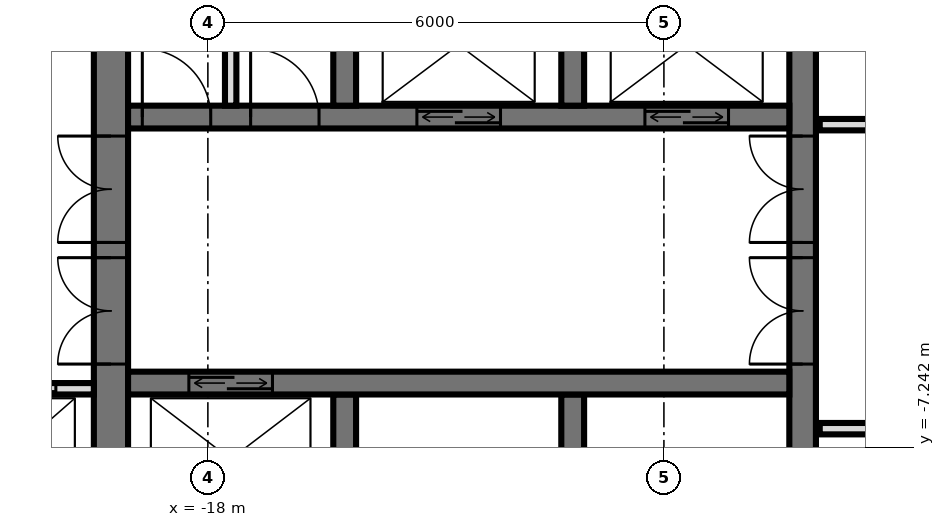
"""IFC4 building model, lengths in metres.
Left out: names, types, materials, properties, quantities, classifications, styles, units other than length and angle.
Written with IfcOpenShell. Run it as: python <this file> out.ifc"""

import sys

from ifc_helpers import new_model, si_unit, direction, frame, frame_2d, origin, place, context, subcontext, project, spatial, rectangle, extrude, element, fill, save


model = new_model("IFC4")
c1 = context("Model", 3, precision=1e-05, world=origin(), true_north=direction((0.0, 1.0)))
c2 = subcontext(c1, "Body", "Model", "MODEL_VIEW")
j1 = project(units=[si_unit("LENGTHUNIT", "METRE"), si_unit("PLANEANGLEUNIT", "RADIAN")], contexts=[c1])
p1 = place(None, origin())
s1 = spatial("IfcSite", under=j1, at=p1, CompositionType="ELEMENT")
p2 = place(p1, origin())
s2 = spatial("IfcBuilding", under=s1, at=p2, CompositionType="ELEMENT")
p3 = place(p2, frame((0.0, 0.0, 246.6)))
s3 = spatial("IfcBuildingStorey", under=s2, at=p3, CompositionType="ELEMENT", Elevation=246.6)
p4 = place(p3, frame((-10.175, -14.55, 0.0), z_axis=(0.0, 0.0, 1.0), x_axis=(0.0, 1.0, 0.0)))
e1 = element("IfcWall", 1, at=p4, inside=s3, PredefinedType="SHEAR", context=c2, shape_type="SweptSolid", body=[
    extrude(rectangle(XDim=14.1, YDim=0.35, at=frame_2d((7.05, 0.0))), origin(), (0.0, 0.0, 1.0), 6.0),
])
p5 = place(p4, frame((8.4, 0.0, 0.0)))
e2 = element("IfcOpeningElement", 2, at=p5, cuts=e1, PredefinedType="OPENING", context=c2, shape_type="SweptSolid", body=[
    extrude(rectangle(XDim=1.4, YDim=2.4, at=frame_2d((0.7, 1.2))), frame((0.0, 0.185, 0.0), z_axis=(0.0, -1.0, 0.0), x_axis=(1.0, 0.0, 0.0)), (0.0, 0.0, 1.0), 0.37),
])
p6 = place(p4, frame((10.0, 0.0, 0.0)))
e3 = element("IfcOpeningElement", 3, at=p6, cuts=e1, PredefinedType="OPENING", context=c2, shape_type="SweptSolid", body=[
    extrude(rectangle(XDim=1.4, YDim=2.4, at=frame_2d((0.7, 1.2))), frame((0.0, 0.185, 0.0), z_axis=(0.0, -1.0, 0.0), x_axis=(1.0, 0.0, 0.0)), (0.0, 0.0, 1.0), 0.37),
])
p7 = place(p4, frame((4.0, 0.0, 0.0)))
e4 = element("IfcOpeningElement", 4, at=p7, cuts=e1, PredefinedType="OPENING", context=c2, shape_type="SweptSolid", body=[
    extrude(rectangle(XDim=1.2, YDim=2.1, at=frame_2d((0.6, 1.05))), frame((0.0, 0.185, 0.0), z_axis=(0.0, -1.0, 0.0), x_axis=(1.0, 0.0, 0.0)), (0.0, 0.0, 1.0), 0.37),
])
p8 = place(p3, frame((-19.275, -14.55, 0.0), z_axis=(0.0, 0.0, 1.0), x_axis=(0.0, 1.0, 0.0)))
e5 = element("IfcWall", 5, at=p8, inside=s3, PredefinedType="SHEAR", context=c2, shape_type="SweptSolid", body=[
    extrude(rectangle(XDim=14.1, YDim=0.45, at=frame_2d((7.05, 0.0))), origin(), (0.0, 0.0, 1.0), 6.0),
])
p9 = place(p8, frame((8.4, 0.0, 0.0)))
e6 = element("IfcOpeningElement", 6, at=p9, cuts=e5, PredefinedType="OPENING", context=c2, shape_type="SweptSolid", body=[
    extrude(rectangle(XDim=1.4, YDim=2.4, at=frame_2d((0.7, 1.2))), frame((0.0, 0.235, 0.0), z_axis=(0.0, -1.0, 0.0), x_axis=(1.0, 0.0, 0.0)), (0.0, 0.0, 1.0), 0.47),
])
p10 = place(p8, frame((10.0, 0.0, 0.0)))
e7 = element("IfcOpeningElement", 7, at=p10, cuts=e5, PredefinedType="OPENING", context=c2, shape_type="SweptSolid", body=[
    extrude(rectangle(XDim=1.4, YDim=2.4, at=frame_2d((0.7, 1.2))), frame((0.0, 0.235, 0.0), z_axis=(0.0, -1.0, 0.0), x_axis=(1.0, 0.0, 0.0)), (0.0, 0.0, 1.0), 0.47),
])
p11 = place(p3, frame((-19.05, -2.9, 0.0), z_axis=(0.0, 0.0, 1.0), x_axis=(1.0, 0.0, 0.0)))
e8 = element("IfcWall", 8, at=p11, inside=s3, PredefinedType="SHEAR", context=c2, shape_type="SweptSolid", body=[
    extrude(rectangle(XDim=8.7, YDim=0.3, at=frame_2d((4.35, 0.0))), origin(), (0.0, 0.0, 1.0), 6.0),
])
p12 = place(p11, frame((6.8, 0.0, 0.0)))
e9 = element("IfcOpeningElement", 9, at=p12, cuts=e8, PredefinedType="OPENING", context=c2, shape_type="SweptSolid", body=[
    extrude(rectangle(XDim=1.1, YDim=2.1, at=frame_2d((0.55, 1.05))), frame((0.0, 0.16, 0.0), z_axis=(0.0, -1.0, 0.0), x_axis=(1.0, 0.0, 0.0)), (0.0, 0.0, 1.0), 0.32),
])
p13 = place(p11, frame((3.8, 0.0, 0.0)))
e10 = element("IfcOpeningElement", 10, at=p13, cuts=e8, PredefinedType="OPENING", context=c2, shape_type="SweptSolid", body=[
    extrude(rectangle(XDim=1.1, YDim=2.1, at=frame_2d((0.55, 1.05))), frame((0.0, 0.16, 0.0), z_axis=(0.0, -1.0, 0.0), x_axis=(1.0, 0.0, 0.0)), (0.0, 0.0, 1.0), 0.32),
])
p14 = place(p11, frame((1.613, 0.0, 0.0)))
e11 = element("IfcOpeningElement", 11, at=p14, cuts=e8, PredefinedType="OPENING", context=c2, shape_type="SweptSolid", body=[
    extrude(rectangle(XDim=0.9, YDim=2.1, at=frame_2d((0.45, 1.05))), frame((0.0, 0.16, 0.0), z_axis=(0.0, -1.0, 0.0), x_axis=(1.0, 0.0, 0.0)), (0.0, 0.0, 1.0), 0.32),
])
p15 = place(p11, frame((0.188, 0.0, 0.0)))
e12 = element("IfcOpeningElement", 12, at=p15, cuts=e8, PredefinedType="OPENING", context=c2, shape_type="SweptSolid", body=[
    extrude(rectangle(XDim=0.9, YDim=2.1, at=frame_2d((0.45, 1.05))), frame((0.0, 0.16, 0.0), z_axis=(0.0, -1.0, 0.0), x_axis=(1.0, 0.0, 0.0)), (0.0, 0.0, 1.0), 0.32),
])
p16 = place(p3, frame((-19.05, -6.4, 0.0), z_axis=(0.0, 0.0, 1.0), x_axis=(1.0, 0.0, 0.0)))
e13 = element("IfcWall", 13, at=p16, inside=s3, PredefinedType="SHEAR", context=c2, shape_type="SweptSolid", body=[
    extrude(rectangle(XDim=8.7, YDim=0.3, at=frame_2d((4.35, 0.0))), origin(), (0.0, 0.0, 1.0), 6.0),
])
p17 = place(p16, frame((0.8, 0.0, 0.0)))
e14 = element("IfcOpeningElement", 14, at=p17, cuts=e13, PredefinedType="OPENING", context=c2, shape_type="SweptSolid", body=[
    extrude(rectangle(XDim=1.1, YDim=2.1, at=frame_2d((0.55, 1.05))), frame((0.0, 0.16, 0.0), z_axis=(0.0, -1.0, 0.0), x_axis=(1.0, 0.0, 0.0)), (0.0, 0.0, 1.0), 0.32),
])
for number, where, z_axis, x_axis in (
    (15, (-13.2, -2.75, 0.0), (0.0, 0.0, 1.0), (0.0, 1.0, 0.0)),
    (16, (-13.2, -8.85, 0.0), (0.0, 0.0, 1.0), (0.0, 1.0, 0.0)),
    (17, (-16.2, -2.75, 0.0), (0.0, 0.0, 1.0), (0.0, 1.0, 0.0)),
    (18, (-16.2, -8.85, 0.0), (0.0, 0.0, 1.0), (0.0, 1.0, 0.0)),
):
    element("IfcWall", number, at=place(p3, frame(where, z_axis=z_axis, x_axis=x_axis)), inside=s3, PredefinedType="SHEAR", context=c2, shape_type="SweptSolid", body=[
        extrude(rectangle(XDim=2.3, YDim=0.3, at=frame_2d((1.15, 0.0))), origin(), (0.0, 0.0, 1.0), 6.0),
    ])
p18 = place(p3, frame((-21.75, -6.475, 0.0), z_axis=(0.0, 0.0, 1.0), x_axis=(1.0, 0.0, 0.0)))
e19 = element("IfcWall", 19, at=p18, inside=s3, PredefinedType="PARTITIONING", context=c2, shape_type="SweptSolid", body=[
    extrude(rectangle(XDim=2.25, YDim=0.15, at=frame_2d((1.125, 0.0))), origin(), (0.0, 0.0, 1.0), 5.2),
])
p19 = place(p18, frame((0.65, 0.0, 0.0)))
e20 = element("IfcOpeningElement", 20, at=p19, cuts=e19, PredefinedType="OPENING", context=c2, shape_type="SweptSolid", body=[
    extrude(rectangle(XDim=1.1, YDim=2.1, at=frame_2d((0.55, 1.05))), frame((0.0, 0.085, 0.0), z_axis=(0.0, -1.0, 0.0), x_axis=(1.0, 0.0, 0.0)), (0.0, 0.0, 1.0), 0.17),
])
p20 = place(p3, frame((-17.7, -2.75, 0.0), z_axis=(0.0, 0.0, 1.0), x_axis=(0.0, 1.0, 0.0)))
e21 = element("IfcWall", 21, at=p20, inside=s3, PredefinedType="PARTITIONING", context=c2, shape_type="SweptSolid", body=[
    extrude(rectangle(XDim=2.3, YDim=0.15, at=frame_2d((1.15, 0.0))), origin(), (0.0, 0.0, 1.0), 5.7),
])
p21 = place(p3, frame((-9.95, -7.0, 0.0), z_axis=(0.0, 0.0, 1.0), x_axis=(1.0, 0.0, 0.0)))
e22 = element("IfcWall", 22, at=p21, inside=s3, PredefinedType="PARTITIONING", context=c2, shape_type="SweptSolid", body=[
    extrude(rectangle(XDim=19.9, YDim=0.15, at=frame_2d((9.95, 0.0))), origin(), (0.0, 0.0, 1.0), 5.7),
])
p22 = place(p21, frame((9.45, 0.0, 0.0)))
e23 = element("IfcOpeningElement", 23, at=p22, cuts=e22, PredefinedType="OPENING", context=c2, shape_type="SweptSolid", body=[
    extrude(rectangle(XDim=1.0, YDim=2.1, at=frame_2d((0.5, 1.05))), frame((0.0, 0.085, 0.0), z_axis=(0.0, -1.0, 0.0), x_axis=(1.0, 0.0, 0.0)), (0.0, 0.0, 1.0), 0.17),
])
p23 = place(p21, frame((2.0, 0.0, 0.0)))
e24 = element("IfcOpeningElement", 24, at=p23, cuts=e22, PredefinedType="OPENING", context=c2, shape_type="SweptSolid", body=[
    extrude(rectangle(XDim=1.0, YDim=2.1, at=frame_2d((0.5, 1.05))), frame((0.0, 0.085, 0.0), z_axis=(0.0, -1.0, 0.0), x_axis=(1.0, 0.0, 0.0)), (0.0, 0.0, 1.0), 0.17),
])
p24 = place(p3, frame((-9.95, -3.0, 0.0), z_axis=(0.0, 0.0, 1.0), x_axis=(1.0, 0.0, 0.0)))
e25 = element("IfcWall", 25, at=p24, inside=s3, PredefinedType="PARTITIONING", context=c2, shape_type="SweptSolid", body=[
    extrude(rectangle(XDim=19.9, YDim=0.15, at=frame_2d((9.95, 0.0))), origin(), (0.0, 0.0, 1.0), 5.7),
])
p25 = place(p24, frame((2.0, 0.0, 0.0)))
e26 = element("IfcOpeningElement", 26, at=p25, cuts=e25, PredefinedType="OPENING", context=c2, shape_type="SweptSolid", body=[
    extrude(rectangle(XDim=1.0, YDim=2.1, at=frame_2d((0.5, 1.05))), frame((0.0, 0.085, 0.0), z_axis=(0.0, -1.0, 0.0), x_axis=(1.0, 0.0, 0.0)), (0.0, 0.0, 1.0), 0.17),
])
p26 = place(p24, frame((8.95, 0.0, 0.0)))
e27 = element("IfcOpeningElement", 27, at=p26, cuts=e25, PredefinedType="OPENING", context=c2, shape_type="SweptSolid", body=[
    extrude(rectangle(XDim=1.0, YDim=2.1, at=frame_2d((0.5, 1.05))), frame((0.0, 0.085, 0.0), z_axis=(0.0, -1.0, 0.0), x_axis=(1.0, 0.0, 0.0)), (0.0, 0.0, 1.0), 0.17),
])
p27 = place(p24, frame((11.7, 0.0, 0.0)))
e28 = element("IfcOpeningElement", 28, at=p27, cuts=e25, PredefinedType="OPENING", context=c2, shape_type="SweptSolid", body=[
    extrude(rectangle(XDim=1.0, YDim=2.1, at=frame_2d((0.5, 1.05))), frame((0.0, 0.085, 0.0), z_axis=(0.0, -1.0, 0.0), x_axis=(1.0, 0.0, 0.0)), (0.0, 0.0, 1.0), 0.17),
])
p28 = place(p24, frame((16.9, 0.0, 0.0)))
e29 = element("IfcOpeningElement", 29, at=p28, cuts=e25, PredefinedType="OPENING", context=c2, shape_type="SweptSolid", body=[
    extrude(rectangle(XDim=1.0, YDim=2.1, at=frame_2d((0.5, 1.05))), frame((0.0, 0.085, 0.0), z_axis=(0.0, -1.0, 0.0), x_axis=(1.0, 0.0, 0.0)), (0.0, 0.0, 1.0), 0.17),
])
p29 = place(p19, origin())
e30 = element("IfcDoor", 30, at=p29, inside=s3, OperationType="DOUBLE_DOOR_SLIDING", PredefinedType="USERDEFINED", context=c2, shape_type="SweptSolid", body=[
    extrude(rectangle(XDim=1.1, YDim=2.1, at=frame_2d((0.55, 1.05))), frame((0.0, 0.025, 0.0), z_axis=(0.0, -1.0, 0.0), x_axis=(1.0, 0.0, 0.0)), (0.0, 0.0, 1.0), 0.05),
])
fill(e20, e30)
p30 = place(p12, origin())
e31 = element("IfcDoor", 31, at=p30, inside=s3, OperationType="DOUBLE_DOOR_SLIDING", PredefinedType="USERDEFINED", context=c2, shape_type="SweptSolid", body=[
    extrude(rectangle(XDim=1.1, YDim=2.1, at=frame_2d((0.55, 1.05))), frame((0.0, 0.025, 0.0), z_axis=(0.0, -1.0, 0.0), x_axis=(1.0, 0.0, 0.0)), (0.0, 0.0, 1.0), 0.05),
])
fill(e9, e31)
p31 = place(p13, origin())
e32 = element("IfcDoor", 32, at=p31, inside=s3, OperationType="DOUBLE_DOOR_SLIDING", PredefinedType="USERDEFINED", context=c2, shape_type="SweptSolid", body=[
    extrude(rectangle(XDim=1.1, YDim=2.1, at=frame_2d((0.55, 1.05))), frame((0.0, 0.025, 0.0), z_axis=(0.0, -1.0, 0.0), x_axis=(1.0, 0.0, 0.0)), (0.0, 0.0, 1.0), 0.05),
])
fill(e10, e32)
p32 = place(p17, origin())
e33 = element("IfcDoor", 33, at=p32, inside=s3, OperationType="DOUBLE_DOOR_SLIDING", PredefinedType="USERDEFINED", context=c2, shape_type="SweptSolid", body=[
    extrude(rectangle(XDim=1.1, YDim=2.1, at=frame_2d((0.55, 1.05))), frame((0.0, 0.025, 0.0), z_axis=(0.0, -1.0, 0.0), x_axis=(1.0, 0.0, 0.0)), (0.0, 0.0, 1.0), 0.05),
])
fill(e14, e33)
p33 = place(p9, origin())
e34 = element("IfcDoor", 34, at=p33, inside=s3, OperationType="DOUBLE_DOOR_SINGLE_SWING", PredefinedType="DOOR", context=c2, shape_type="SweptSolid", body=[
    extrude(rectangle(XDim=1.4, YDim=2.4, at=frame_2d((0.7, 1.2))), frame((0.0, 0.025, 0.0), z_axis=(0.0, -1.0, 0.0), x_axis=(1.0, 0.0, 0.0)), (0.0, 0.0, 1.0), 0.05),
])
fill(e6, e34)
p34 = place(p10, origin())
e35 = element("IfcDoor", 35, at=p34, inside=s3, OperationType="DOUBLE_DOOR_SINGLE_SWING", PredefinedType="DOOR", context=c2, shape_type="SweptSolid", body=[
    extrude(rectangle(XDim=1.4, YDim=2.4, at=frame_2d((0.7, 1.2))), frame((0.0, 0.025, 0.0), z_axis=(0.0, -1.0, 0.0), x_axis=(1.0, 0.0, 0.0)), (0.0, 0.0, 1.0), 0.05),
])
fill(e7, e35)
p35 = place(p5, origin())
e36 = element("IfcDoor", 36, at=p35, inside=s3, OperationType="DOUBLE_DOOR_SINGLE_SWING", PredefinedType="DOOR", context=c2, shape_type="SweptSolid", body=[
    extrude(rectangle(XDim=1.4, YDim=2.4, at=frame_2d((0.7, 1.2))), frame((0.0, 0.025, 0.0), z_axis=(0.0, -1.0, 0.0), x_axis=(1.0, 0.0, 0.0)), (0.0, 0.0, 1.0), 0.05),
])
fill(e2, e36)
p36 = place(p6, origin())
e37 = element("IfcDoor", 37, at=p36, inside=s3, OperationType="DOUBLE_DOOR_SINGLE_SWING", PredefinedType="DOOR", context=c2, shape_type="SweptSolid", body=[
    extrude(rectangle(XDim=1.4, YDim=2.4, at=frame_2d((0.7, 1.2))), frame((0.0, 0.025, 0.0), z_axis=(0.0, -1.0, 0.0), x_axis=(1.0, 0.0, 0.0)), (0.0, 0.0, 1.0), 0.05),
])
fill(e3, e37)
p37 = place(p14, origin())
e38 = element("IfcDoor", 38, at=p37, inside=s3, OperationType="SINGLE_SWING_RIGHT", PredefinedType="DOOR", context=c2, shape_type="SweptSolid", body=[
    extrude(rectangle(XDim=0.9, YDim=2.1, at=frame_2d((0.45, 1.05))), frame((0.0, 0.025, 0.0), z_axis=(0.0, -1.0, 0.0), x_axis=(1.0, 0.0, 0.0)), (0.0, 0.0, 1.0), 0.05),
])
fill(e11, e38)
p38 = place(p15, origin())
e39 = element("IfcDoor", 39, at=p38, inside=s3, OperationType="SINGLE_SWING_RIGHT", PredefinedType="DOOR", context=c2, shape_type="SweptSolid", body=[
    extrude(rectangle(XDim=0.9, YDim=2.1, at=frame_2d((0.45, 1.05))), frame((0.0, 0.025, 0.0), z_axis=(0.0, -1.0, 0.0), x_axis=(1.0, 0.0, 0.0)), (0.0, 0.0, 1.0), 0.05),
])
fill(e12, e39)
save(model, sys.argv[1])
